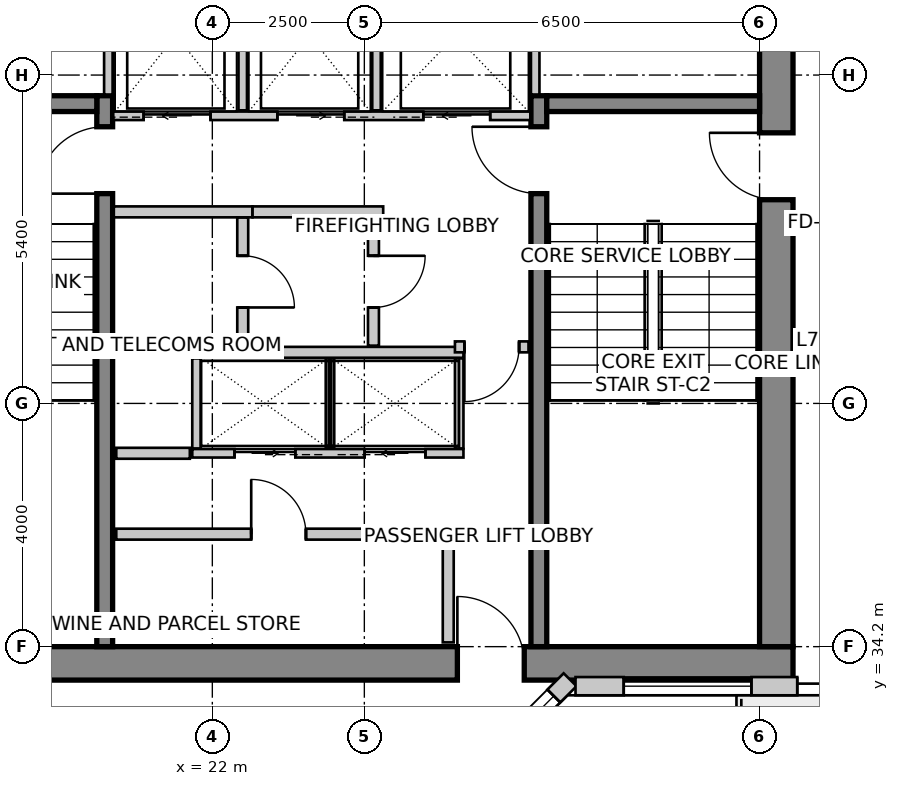
"""IFC4 building model, lengths in metres.
Left out: names, types, materials, properties, quantities, classifications, styles, units other than length and angle.
Written with IfcOpenShell. Run it as: python <this file> out.ifc"""

import sys

from ifc_helpers import new_model, si_unit, direction, frame, frame_2d, origin, place, context, subcontext, project, spatial, rectangle, extrude, source, transform, mapped, element, fill, save


model = new_model("IFC4")
c1 = context("Model", 3, precision=1e-05, world=origin(), true_north=direction((0.0, 1.0)))
c2 = subcontext(c1, "Body", "Model", "MODEL_VIEW")
j1 = project(units=[si_unit("LENGTHUNIT", "METRE"), si_unit("PLANEANGLEUNIT", "RADIAN")], contexts=[c1])
p1 = place(None, origin())
s1 = spatial("IfcSite", under=j1, at=p1, CompositionType="ELEMENT")
p2 = place(p1, origin())
s2 = spatial("IfcBuilding", under=s1, at=p2, CompositionType="ELEMENT")
p3 = place(p2, frame((0.0, 0.0, 278.1)))
s3 = spatial("IfcBuildingStorey", under=s2, at=p3, CompositionType="ELEMENT", Elevation=278.1)
p4 = place(p3, frame((16.05, 33.925, 0.0), z_axis=(0.0, 0.0, 1.0), x_axis=(1.0, 0.0, 0.0)))
e1 = element("IfcWall", 1, at=p4, inside=s3, PredefinedType="SHEAR", context=c2, shape_type="SweptSolid", body=[
    extrude(rectangle(XDim=15.5, YDim=0.55, at=frame_2d((7.75, 0.0))), origin(), (0.0, 0.0, 1.0), 3.6),
])
m1 = source(origin(), c2, "Body", "SweptSolid", [
    extrude(rectangle(XDim=1.1, YDim=2.15, at=frame_2d((0.55, 1.075))), frame((0.0, 0.285, 0.0), z_axis=(0.0, -1.0, 0.0), x_axis=(1.0, 0.0, 0.0)), (0.0, 0.0, 1.0), 0.57),
])
p5 = place(p4, frame((9.98, 0.0, 0.0)))
e2 = element("IfcOpeningElement", 2, at=p5, cuts=e1, PredefinedType="OPENING", context=c2, shape_type="MappedRepresentation", body=[
    mapped(m1, transform((0.0, 0.0, 0.0), scale=1.0)),
])
p6 = place(p3, frame((31.275, 34.2, 0.0), z_axis=(0.0, 0.0, 1.0), x_axis=(0.0, 1.0, 0.0)))
e3 = element("IfcWall", 3, at=p6, inside=s3, PredefinedType="SHEAR", context=c2, shape_type="SweptSolid", body=[
    extrude(rectangle(XDim=11.4, YDim=0.55, at=frame_2d((5.7, 0.0))), origin(), (0.0, 0.0, 1.0), 3.6),
])
p7 = place(p6, frame((7.35, 0.0, 0.0)))
e4 = element("IfcOpeningElement", 4, at=p7, cuts=e3, PredefinedType="OPENING", context=c2, shape_type="MappedRepresentation", body=[
    mapped(m1, transform((0.0, 0.0, 0.0), scale=1.0)),
])
p8 = place(p3, frame((20.23, 34.2, 0.0), z_axis=(0.0, 0.0, 1.0), x_axis=(0.0, 1.0, 0.0)))
e5 = element("IfcWall", 5, at=p8, inside=s3, PredefinedType="SHEAR", context=c2, shape_type="SweptSolid", body=[
    extrude(rectangle(XDim=9.06, YDim=0.26, at=frame_2d((4.53, 0.0))), origin(), (0.0, 0.0, 1.0), 3.6),
])
m2 = source(origin(), c2, "Body", "SweptSolid", [
    extrude(rectangle(XDim=1.1, YDim=2.15, at=frame_2d((0.55, 1.075))), frame((0.0, 0.14, 0.0), z_axis=(0.0, -1.0, 0.0), x_axis=(1.0, 0.0, 0.0)), (0.0, 0.0, 1.0), 0.28),
])
p9 = place(p8, frame((7.45, 0.0, 0.0)))
e6 = element("IfcOpeningElement", 6, at=p9, cuts=e5, PredefinedType="OPENING", context=c2, shape_type="MappedRepresentation", body=[
    mapped(m2, transform((0.0, 0.0, 0.0), scale=1.0)),
])
p10 = place(p3, frame((27.37, 34.2, 0.0), z_axis=(0.0, 0.0, 1.0), x_axis=(0.0, 1.0, 0.0)))
e7 = element("IfcWall", 7, at=p10, inside=s3, PredefinedType="SHEAR", context=c2, shape_type="SweptSolid", body=[
    extrude(rectangle(XDim=9.06, YDim=0.26, at=frame_2d((4.53, 0.0))), origin(), (0.0, 0.0, 1.0), 3.6),
])
p11 = place(p10, frame((7.45, 0.0, 0.0)))
e8 = element("IfcOpeningElement", 8, at=p11, cuts=e7, PredefinedType="OPENING", context=c2, shape_type="MappedRepresentation", body=[
    mapped(m2, transform((0.0, 0.0, 0.0), scale=1.0)),
])
for number, where, z_axis, x_axis in (
    (9, (16.6, 43.13, 0.0), (0.0, 0.0, 1.0), (1.0, 0.0, 0.0)),
    (10, (27.5, 43.13, 0.0), (0.0, 0.0, 1.0), (1.0, 0.0, 0.0)),
):
    element("IfcWall", number, at=place(p3, frame(where, z_axis=z_axis, x_axis=x_axis)), inside=s3, PredefinedType="SHEAR", context=c2, shape_type="SweptSolid", body=[
        extrude(rectangle(XDim=3.5, YDim=0.26, at=frame_2d((1.75, 0.0))), origin(), (0.0, 0.0, 1.0), 3.6),
    ])
p12 = place(p3, frame((25.828, 31.6, 0.0), z_axis=(0.0, 0.0, 1.0), x_axis=(0.707106781187, 0.707106781187, 0.0)))
e11 = element("IfcWall", 11, at=p12, inside=s3, PredefinedType="SOLIDWALL", context=c2, shape_type="SweptSolid", body=[
    extrude(rectangle(XDim=2.907, YDim=0.3, at=frame_2d((1.454, 0.0))), origin(), (0.0, 0.0, 1.0), 3.35),
])
m3 = source(origin(), c2, "Body", "SweptSolid", [
    extrude(rectangle(XDim=1.8, YDim=2.1, at=frame_2d((0.9, 1.05))), frame((0.0, 0.16, 0.0), z_axis=(0.0, -1.0, 0.0), x_axis=(1.0, 0.0, 0.0)), (0.0, 0.0, 1.0), 0.32),
])
p13 = place(p12, frame((0.729, 0.0, 0.85)))
e12 = element("IfcOpeningElement", 12, at=p13, cuts=e11, PredefinedType="OPENING", context=c2, shape_type="MappedRepresentation", body=[
    mapped(m3, transform((0.0, 0.0, 0.0), scale=1.0)),
])
p14 = place(p3, frame((27.973, 33.55, 0.0), z_axis=(0.0, 0.0, 1.0), x_axis=(1.0, 0.0, 0.0)))
e13 = element("IfcWall", 13, at=p14, inside=s3, PredefinedType="SOLIDWALL", context=c2, shape_type="SweptSolid", body=[
    extrude(rectangle(XDim=9.115, YDim=0.3, at=frame_2d((4.558, 0.0))), origin(), (0.0, 0.0, 1.0), 3.35),
])
m4 = source(origin(), c2, "Body", "SweptSolid", [
    extrude(rectangle(XDim=1.6, YDim=2.15, at=frame_2d((0.8, 1.075))), frame((0.0, 0.16, 0.0), z_axis=(0.0, -1.0, 0.0), x_axis=(1.0, 0.0, 0.0)), (0.0, 0.0, 1.0), 0.32),
])
p15 = place(p14, frame((3.647, 0.0, 0.0)))
e14 = element("IfcOpeningElement", 14, at=p15, cuts=e13, PredefinedType="OPENING", context=c2, shape_type="MappedRepresentation", body=[
    mapped(m4, transform((0.0, 0.0, 0.0), scale=1.0)),
])
m5 = source(origin(), c2, "Body", "SweptSolid", [
    extrude(rectangle(XDim=2.1, YDim=2.0, at=frame_2d((1.05, 1.0))), frame((0.0, 0.16, 0.0), z_axis=(0.0, -1.0, 0.0), x_axis=(1.0, 0.0, 0.0)), (0.0, 0.0, 1.0), 0.32),
])
p16 = place(p14, frame((0.793, 0.0, 0.85)))
e15 = element("IfcOpeningElement", 15, at=p16, cuts=e13, PredefinedType="OPENING", context=c2, shape_type="MappedRepresentation", body=[
    mapped(m5, transform((0.0, 0.0, 0.0), scale=1.0)),
])
p17 = place(p14, frame((6.111, 0.0, 0.85)))
e16 = element("IfcOpeningElement", 16, at=p17, cuts=e13, PredefinedType="OPENING", context=c2, shape_type="MappedRepresentation", body=[
    mapped(m5, transform((0.0, 0.0, 0.0), scale=1.0)),
])
p18 = place(p3, frame((20.37, 42.93, 0.0), z_axis=(0.0, 0.0, 1.0), x_axis=(1.0, 0.0, 0.0)))
e17 = element("IfcWall", 17, at=p18, inside=s3, PredefinedType="SOLIDWALL", context=c2, shape_type="SweptSolid", body=[
    extrude(rectangle(XDim=6.86, YDim=0.14, at=frame_2d((3.43, 0.0))), origin(), (0.0, 0.0, 1.0), 3.35),
])
m6 = source(origin(), c2, "Body", "SweptSolid", [
    extrude(rectangle(XDim=1.1, YDim=2.15, at=frame_2d((0.55, 1.075))), frame((0.0, 0.08, 0.0), z_axis=(0.0, -1.0, 0.0), x_axis=(1.0, 0.0, 0.0)), (0.0, 0.0, 1.0), 0.16),
])
p19 = place(p18, frame((0.5, 0.0, 0.0)))
e18 = element("IfcOpeningElement", 18, at=p19, cuts=e17, PredefinedType="OPENING", context=c2, shape_type="MappedRepresentation", body=[
    mapped(m6, transform((0.0, 0.0, 0.0), scale=1.0)),
])
p20 = place(p18, frame((2.7, 0.0, 0.0)))
e19 = element("IfcOpeningElement", 19, at=p20, cuts=e17, PredefinedType="OPENING", context=c2, shape_type="MappedRepresentation", body=[
    mapped(m6, transform((0.0, 0.0, 0.0), scale=1.0)),
])
p21 = place(p18, frame((5.1, 0.0, 0.0)))
e20 = element("IfcOpeningElement", 20, at=p21, cuts=e17, PredefinedType="OPENING", context=c2, shape_type="MappedRepresentation", body=[
    mapped(m6, transform((0.0, 0.0, 0.0), scale=1.0)),
])
for number, where, z_axis, x_axis in (
    (21, (20.29, 43.28, 0.0), (0.0, 0.0, 1.0), (0.0, 1.0, 0.0)),
    (22, (27.31, 43.28, 0.0), (0.0, 0.0, 1.0), (0.0, 1.0, 0.0)),
):
    element("IfcWall", number, at=place(p3, frame(where, z_axis=z_axis, x_axis=x_axis)), inside=s3, PredefinedType="SOLIDWALL", context=c2, shape_type="SweptSolid", body=[
        extrude(rectangle(XDim=2.3, YDim=0.14, at=frame_2d((1.15, 0.0))), origin(), (0.0, 0.0, 1.0), 3.35),
    ])
for number, where, z_axis, x_axis in (
    (23, (22.5, 43.02, 0.0), (0.0, 0.0, 1.0), (0.0, 1.0, 0.0)),
    (24, (24.7, 43.02, 0.0), (0.0, 0.0, 1.0), (0.0, 1.0, 0.0)),
):
    element("IfcWall", number, at=place(p3, frame(where, z_axis=z_axis, x_axis=x_axis)), inside=s3, PredefinedType="SOLIDWALL", context=c2, shape_type="SweptSolid", body=[
        extrude(rectangle(XDim=2.56, YDim=0.14, at=frame_2d((1.28, 0.0))), origin(), (0.0, 0.0, 1.0), 3.35),
    ])
p22 = place(p3, frame((21.67, 37.38, 0.0), z_axis=(0.0, 0.0, 1.0), x_axis=(1.0, 0.0, 0.0)))
e25 = element("IfcWall", 25, at=p22, inside=s3, PredefinedType="SOLIDWALL", context=c2, shape_type="SweptSolid", body=[
    extrude(rectangle(XDim=4.46, YDim=0.14, at=frame_2d((2.23, 0.0))), origin(), (0.0, 0.0, 1.0), 3.35),
])
m7 = source(origin(), c2, "Body", "SweptSolid", [
    extrude(rectangle(XDim=1.0, YDim=2.15, at=frame_2d((0.5, 1.075))), frame((0.0, 0.08, 0.0), z_axis=(0.0, -1.0, 0.0), x_axis=(1.0, 0.0, 0.0)), (0.0, 0.0, 1.0), 0.16),
])
p23 = place(p22, frame((0.695, 0.0, 0.0)))
e26 = element("IfcOpeningElement", 26, at=p23, cuts=e25, PredefinedType="OPENING", context=c2, shape_type="MappedRepresentation", body=[
    mapped(m7, transform((0.0, 0.0, 0.0), scale=1.0)),
])
p24 = place(p22, frame((2.835, 0.0, 0.0)))
e27 = element("IfcOpeningElement", 27, at=p24, cuts=e25, PredefinedType="OPENING", context=c2, shape_type="MappedRepresentation", body=[
    mapped(m7, transform((0.0, 0.0, 0.0), scale=1.0)),
])
p25 = place(p3, frame((21.67, 39.04, 0.0), z_axis=(0.0, 0.0, 1.0), x_axis=(1.0, 0.0, 0.0)))
e28 = element("IfcWall", 28, at=p25, inside=s3, PredefinedType="SOLIDWALL", context=c2, shape_type="SweptSolid", body=[
    extrude(rectangle(XDim=4.46, YDim=0.18, at=frame_2d((2.23, 0.0))), origin(), (0.0, 0.0, 1.0), 3.35),
])
for number, where, z_axis, x_axis in (
    (29, (26.06, 37.46, 0.0), (0.0, 0.0, 1.0), (0.0, 1.0, 0.0)),
    (30, (21.74, 37.46, 0.0), (0.0, 0.0, 1.0), (0.0, 1.0, 0.0)),
    (31, (23.935, 37.46, 0.0), (0.0, 0.0, 1.0), (0.0, 1.0, 0.0)),
):
    element("IfcWall", number, at=place(p3, frame(where, z_axis=z_axis, x_axis=x_axis)), inside=s3, PredefinedType="SOLIDWALL", context=c2, shape_type="SweptSolid", body=[
        extrude(rectangle(XDim=1.48, YDim=0.14, at=frame_2d((0.74, 0.0))), origin(), (0.0, 0.0, 1.0), 3.35),
    ])
p26 = place(p3, frame((22.66, 41.35, 0.0), z_axis=(0.0, 0.0, 1.0), x_axis=(-1.0, 0.0, 0.0)))
e32 = element("IfcWall", 32, at=p26, inside=s3, PredefinedType="PARTITIONING", context=c2, shape_type="SweptSolid", body=[
    extrude(rectangle(XDim=2.28, YDim=0.18, at=frame_2d((1.14, 0.0))), origin(), (0.0, 0.0, 1.0), 3.35),
])
p27 = place(p3, frame((24.81, 41.35, 0.0), z_axis=(0.0, 0.0, 1.0), x_axis=(-1.0, 0.0, 0.0)))
e33 = element("IfcWall", 33, at=p27, inside=s3, PredefinedType="PARTITIONING", context=c2, shape_type="SweptSolid", body=[
    extrude(rectangle(XDim=2.148, YDim=0.18, at=frame_2d((1.074, 0.0))), origin(), (0.0, 0.0, 1.0), 3.35),
])
p28 = place(p3, frame((22.5, 41.256, 0.0), z_axis=(0.0, 0.0, 1.0), x_axis=(0.0, -1.0, 0.0)))
e34 = element("IfcWall", 34, at=p28, inside=s3, PredefinedType="PARTITIONING", context=c2, shape_type="SweptSolid", body=[
    extrude(rectangle(XDim=2.106, YDim=0.18, at=frame_2d((1.053, 0.0))), origin(), (0.0, 0.0, 1.0), 3.35),
])
m8 = source(origin(), c2, "Body", "SweptSolid", [
    extrude(rectangle(XDim=0.85, YDim=2.15, at=frame_2d((0.425, 1.075))), frame((0.0, 0.1, 0.0), z_axis=(0.0, -1.0, 0.0), x_axis=(1.0, 0.0, 0.0)), (0.0, 0.0, 1.0), 0.2),
])
p29 = place(p28, frame((0.628, 0.0, 0.0)))
e35 = element("IfcOpeningElement", 35, at=p29, cuts=e34, PredefinedType="OPENING", context=c2, shape_type="MappedRepresentation", body=[
    mapped(m8, transform((0.0, 0.0, 0.0), scale=1.0)),
])
p30 = place(p3, frame((21.63, 37.38, 0.0), z_axis=(0.0, 0.0, 1.0), x_axis=(-1.0, 0.0, 0.0)))
e36 = element("IfcWall", 36, at=p30, inside=s3, PredefinedType="PARTITIONING", context=c2, shape_type="SweptSolid", body=[
    extrude(rectangle(XDim=1.21, YDim=0.18, at=frame_2d((0.605, 0.0))), origin(), (0.0, 0.0, 1.0), 3.35),
])
p31 = place(p3, frame((24.65, 41.256, 0.0), z_axis=(0.0, 0.0, 1.0), x_axis=(0.0, -1.0, 0.0)))
e37 = element("IfcWall", 37, at=p31, inside=s3, PredefinedType="PARTITIONING", context=c2, shape_type="SweptSolid", body=[
    extrude(rectangle(XDim=2.106, YDim=0.18, at=frame_2d((1.053, 0.0))), origin(), (0.0, 0.0, 1.0), 3.35),
])
p32 = place(p31, frame((0.628, 0.0, 0.0)))
e38 = element("IfcOpeningElement", 38, at=p32, cuts=e37, PredefinedType="OPENING", context=c2, shape_type="MappedRepresentation", body=[
    mapped(m8, transform((0.0, 0.0, 0.0), scale=1.0)),
])
p33 = place(p3, frame((27.2, 39.13, 0.0), z_axis=(0.0, 0.0, 1.0), x_axis=(-1.0, 0.0, 0.0)))
e39 = element("IfcWall", 39, at=p33, inside=s3, PredefinedType="PARTITIONING", context=c2, shape_type="SweptSolid", body=[
    extrude(rectangle(XDim=1.21, YDim=0.18, at=frame_2d((0.605, 0.0))), origin(), (0.0, 0.0, 1.0), 3.35),
])
m9 = source(origin(), c2, "Body", "SweptSolid", [
    extrude(rectangle(XDim=0.9, YDim=2.15, at=frame_2d((0.45, 1.075))), frame((0.0, 0.1, 0.0), z_axis=(0.0, -1.0, 0.0), x_axis=(1.0, 0.0, 0.0)), (0.0, 0.0, 1.0), 0.2),
])
p34 = place(p33, frame((0.155, 0.0, 0.0)))
e40 = element("IfcOpeningElement", 40, at=p34, cuts=e39, PredefinedType="OPENING", context=c2, shape_type="MappedRepresentation", body=[
    mapped(m9, transform((0.0, 0.0, 0.0), scale=1.0)),
])
p35 = place(p3, frame((20.42, 36.05, 0.0), z_axis=(0.0, 0.0, 1.0), x_axis=(1.0, 0.0, 0.0)))
e41 = element("IfcWall", 41, at=p35, inside=s3, PredefinedType="PARTITIONING", context=c2, shape_type="SweptSolid", body=[
    extrude(rectangle(XDim=5.46, YDim=0.18, at=frame_2d((2.73, 0.0))), origin(), (0.0, 0.0, 1.0), 3.35),
])
p36 = place(p35, frame((2.219, 0.0, 0.0)))
e42 = element("IfcOpeningElement", 42, at=p36, cuts=e41, PredefinedType="OPENING", context=c2, shape_type="MappedRepresentation", body=[
    mapped(m9, transform((0.0, 0.0, 0.0), scale=1.0)),
])
p37 = place(p3, frame((25.88, 35.956, 0.0), z_axis=(0.0, 0.0, 1.0), x_axis=(0.0, -1.0, 0.0)))
e43 = element("IfcWall", 43, at=p37, inside=s3, PredefinedType="PARTITIONING", context=c2, shape_type="SweptSolid", body=[
    extrude(rectangle(XDim=1.686, YDim=0.18, at=frame_2d((0.843, 0.0))), origin(), (0.0, 0.0, 1.0), 2.642),
])
m10 = source(origin(), c2, "Body", "SweptSolid", [
    extrude(rectangle(XDim=1.8, YDim=2.1, at=frame_2d((0.9, 1.05))), frame((0.0, -0.015, 0.0), z_axis=(0.0, -1.0, 0.0), x_axis=(1.0, 0.0, 0.0)), (0.0, 0.0, 1.0), 0.06),
])
p38 = place(p13, origin())
e44 = element("IfcWindow", 44, at=p38, inside=s3, PartitioningType="SINGLE_PANEL", PredefinedType="WINDOW", context=c2, shape_type="MappedRepresentation", body=[
    mapped(m10, transform((0.0, 0.0, 0.0), scale=1.0)),
])
fill(e12, e44)
m11 = source(origin(), c2, "Body", "SweptSolid", [
    extrude(rectangle(XDim=1.6, YDim=2.15, at=frame_2d((0.8, 1.075))), frame((0.0, 0.025, 0.0), z_axis=(0.0, -1.0, 0.0), x_axis=(1.0, 0.0, 0.0)), (0.0, 0.0, 1.0), 0.05),
])
p39 = place(p15, origin())
e45 = element("IfcDoor", 45, at=p39, inside=s3, OperationType="DOUBLE_DOOR_SLIDING", PredefinedType="DOOR", context=c2, shape_type="MappedRepresentation", body=[
    mapped(m11, transform((0.0, 0.0, 0.0), scale=1.0)),
])
fill(e14, e45)
m12 = source(origin(), c2, "Body", "SweptSolid", [
    extrude(rectangle(XDim=2.1, YDim=2.0, at=frame_2d((1.05, 1.0))), frame((0.0, -0.015, 0.0), z_axis=(0.0, -1.0, 0.0), x_axis=(1.0, 0.0, 0.0)), (0.0, 0.0, 1.0), 0.06),
])
p40 = place(p16, origin())
e46 = element("IfcWindow", 46, at=p40, inside=s3, PartitioningType="SINGLE_PANEL", PredefinedType="WINDOW", context=c2, shape_type="MappedRepresentation", body=[
    mapped(m12, transform((0.0, 0.0, 0.0), scale=1.0)),
])
fill(e15, e46)
m13 = source(origin(), c2, "Body", "SweptSolid", [
    extrude(rectangle(XDim=1.1, YDim=2.15, at=frame_2d((0.55, 1.075))), frame((0.0, 0.025, 0.0), z_axis=(0.0, -1.0, 0.0), x_axis=(1.0, 0.0, 0.0)), (0.0, 0.0, 1.0), 0.05),
])
p41 = place(p19, origin())
e47 = element("IfcDoor", 47, at=p41, inside=s3, OperationType="SLIDING_TO_LEFT", PredefinedType="DOOR", context=c2, shape_type="MappedRepresentation", body=[
    mapped(m13, transform((0.0, 0.0, 0.0), scale=1.0)),
])
fill(e18, e47)
p42 = place(p20, origin())
e48 = element("IfcDoor", 48, at=p42, inside=s3, OperationType="SLIDING_TO_RIGHT", PredefinedType="DOOR", context=c2, shape_type="MappedRepresentation", body=[
    mapped(m13, transform((0.0, 0.0, 0.0), scale=1.0)),
])
fill(e19, e48)
m14 = source(origin(), c2, "Body", "SweptSolid", [
    extrude(rectangle(XDim=1.1, YDim=2.15, at=frame_2d((0.55, 1.075))), frame((0.0, 0.025, 0.0), z_axis=(0.0, -1.0, 0.0), x_axis=(1.0, 0.0, 0.0)), (0.0, 0.0, 1.0), 0.05),
])
p43 = place(p21, origin())
e49 = element("IfcDoor", 49, at=p43, inside=s3, OperationType="SLIDING_TO_LEFT", PredefinedType="DOOR", context=c2, shape_type="MappedRepresentation", body=[
    mapped(m14, transform((0.0, 0.0, 0.0), scale=1.0)),
])
fill(e20, e49)
m15 = source(origin(), c2, "Body", "SweptSolid", [
    extrude(rectangle(XDim=1.0, YDim=2.15, at=frame_2d((0.5, 1.075))), frame((0.0, 0.025, 0.0), z_axis=(0.0, -1.0, 0.0), x_axis=(1.0, 0.0, 0.0)), (0.0, 0.0, 1.0), 0.05),
])
p44 = place(p23, origin())
e50 = element("IfcDoor", 50, at=p44, inside=s3, OperationType="SLIDING_TO_RIGHT", PredefinedType="DOOR", context=c2, shape_type="MappedRepresentation", body=[
    mapped(m15, transform((0.0, 0.0, 0.0), scale=1.0)),
])
fill(e26, e50)
p45 = place(p24, origin())
e51 = element("IfcDoor", 51, at=p45, inside=s3, OperationType="SLIDING_TO_LEFT", PredefinedType="DOOR", context=c2, shape_type="MappedRepresentation", body=[
    mapped(m15, transform((0.0, 0.0, 0.0), scale=1.0)),
])
fill(e27, e51)
m16 = source(origin(), c2, "Body", "SweptSolid", [
    extrude(rectangle(XDim=1.1, YDim=2.15, at=frame_2d((0.55, 1.075))), frame((0.0, 0.025, 0.0), z_axis=(0.0, -1.0, 0.0), x_axis=(1.0, 0.0, 0.0)), (0.0, 0.0, 1.0), 0.05),
])
p46 = place(p9, origin())
e52 = element("IfcDoor", 52, at=p46, inside=s3, OperationType="SINGLE_SWING_LEFT", PredefinedType="DOOR", context=c2, shape_type="MappedRepresentation", body=[
    mapped(m16, transform((0.0, 0.0, 0.0), scale=1.0)),
])
fill(e6, e52)
p47 = place(p11, origin())
e53 = element("IfcDoor", 53, at=p47, inside=s3, OperationType="SINGLE_SWING_RIGHT", PredefinedType="DOOR", context=c2, shape_type="MappedRepresentation", body=[
    mapped(m16, transform((0.0, 0.0, 0.0), scale=1.0)),
])
fill(e8, e53)
p48 = place(p7, origin())
e54 = element("IfcDoor", 54, at=p48, inside=s3, OperationType="SINGLE_SWING_RIGHT", PredefinedType="DOOR", context=c2, shape_type="MappedRepresentation", body=[
    mapped(m16, transform((0.0, 0.0, 0.0), scale=1.0)),
])
fill(e4, e54)
p49 = place(p5, origin())
e55 = element("IfcDoor", 55, at=p49, inside=s3, OperationType="SINGLE_SWING_LEFT", PredefinedType="DOOR", context=c2, shape_type="MappedRepresentation", body=[
    mapped(m16, transform((0.0, 0.0, 0.0), scale=1.0)),
])
fill(e2, e55)
m17 = source(origin(), c2, "Body", "SweptSolid", [
    extrude(rectangle(XDim=0.85, YDim=2.15, at=frame_2d((0.425, 1.075))), frame((0.0, 0.025, 0.0), z_axis=(0.0, -1.0, 0.0), x_axis=(1.0, 0.0, 0.0)), (0.0, 0.0, 1.0), 0.05),
])
p50 = place(p29, origin())
e56 = element("IfcDoor", 56, at=p50, inside=s3, OperationType="SINGLE_SWING_RIGHT", PredefinedType="DOOR", context=c2, shape_type="MappedRepresentation", body=[
    mapped(m17, transform((0.0, 0.0, 0.0), scale=1.0)),
])
fill(e35, e56)
p51 = place(p32, origin())
e57 = element("IfcDoor", 57, at=p51, inside=s3, OperationType="SINGLE_SWING_LEFT", PredefinedType="DOOR", context=c2, shape_type="MappedRepresentation", body=[
    mapped(m17, transform((0.0, 0.0, 0.0), scale=1.0)),
])
fill(e38, e57)
m18 = source(origin(), c2, "Body", "SweptSolid", [
    extrude(rectangle(XDim=0.9, YDim=2.15, at=frame_2d((0.45, 1.075))), frame((0.0, 0.025, 0.0), z_axis=(0.0, -1.0, 0.0), x_axis=(1.0, 0.0, 0.0)), (0.0, 0.0, 1.0), 0.05),
])
p52 = place(p34, origin())
e58 = element("IfcDoor", 58, at=p52, inside=s3, OperationType="SINGLE_SWING_RIGHT", PredefinedType="DOOR", context=c2, shape_type="MappedRepresentation", body=[
    mapped(m18, transform((0.0, 0.0, 0.0), scale=1.0)),
])
fill(e40, e58)
p53 = place(p36, origin())
e59 = element("IfcDoor", 59, at=p53, inside=s3, OperationType="SINGLE_SWING_LEFT", PredefinedType="DOOR", context=c2, shape_type="MappedRepresentation", body=[
    mapped(m18, transform((0.0, 0.0, 0.0), scale=1.0)),
])
fill(e42, e59)
save(model, sys.argv[1])
